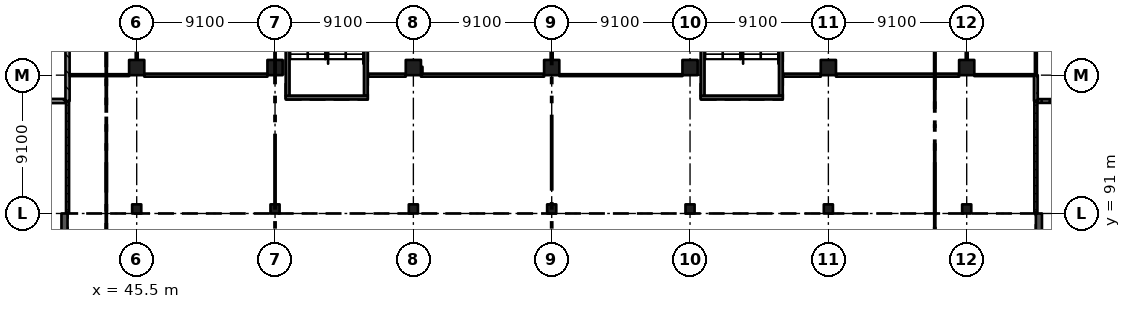
"""IFC4 building model, lengths in metres.
Left out: names, types, materials, properties, quantities, classifications, styles, units other than length and angle.
Written with IfcOpenShell. Run it as: python <this file> out.ifc"""

import sys

from ifc_helpers import new_model, si_unit, direction, frame, frame_2d, origin, origin_2d, place, context, subcontext, project, spatial, rectangle, extrude, element, fill, save


model = new_model("IFC4")
c1 = context("Model", 3, precision=1e-05, world=origin(), true_north=direction((0.0, 1.0)))
c2 = subcontext(c1, "Body", "Model", "MODEL_VIEW")
j1 = project(units=[si_unit("LENGTHUNIT", "METRE"), si_unit("PLANEANGLEUNIT", "RADIAN")], contexts=[c1])
p1 = place(None, origin())
s1 = spatial("IfcSite", under=j1, at=p1, CompositionType="ELEMENT")
p2 = place(p1, origin())
s2 = spatial("IfcBuilding", under=s1, at=p2, CompositionType="ELEMENT")
p3 = place(p2, frame((0.0, 0.0, 6.37)))
s3 = spatial("IfcBuildingStorey", under=s2, at=p3, CompositionType="ELEMENT", Elevation=6.37)
p4 = place(p3, frame((45.5, 91.3, 0.0), z_axis=(0.0, 0.0, 1.0), x_axis=(1.0, 0.0, 0.0)))
e1 = element("IfcColumn", 1, at=p4, inside=s3, PredefinedType="COLUMN", context=c2, shape_type="SweptSolid", body=[
    extrude(rectangle(XDim=0.6, YDim=0.6, at=origin_2d()), origin(), (0.0, 0.0, 1.0), 4.55),
])
p5 = place(p3, frame((45.5, 100.6, 0.0), z_axis=(0.0, 0.0, 1.0), x_axis=(1.0, 0.0, 0.0)))
e2 = element("IfcColumn", 2, at=p5, inside=s3, PredefinedType="COLUMN", context=c2, shape_type="SweptSolid", body=[
    extrude(rectangle(XDim=1.0, YDim=1.0, at=origin_2d()), origin(), (0.0, 0.0, 1.0), 4.55),
])
p6 = place(p3, frame((54.6, 91.3, 0.0), z_axis=(0.0, 0.0, 1.0), x_axis=(1.0, 0.0, 0.0)))
e3 = element("IfcColumn", 3, at=p6, inside=s3, PredefinedType="COLUMN", context=c2, shape_type="SweptSolid", body=[
    extrude(rectangle(XDim=0.6, YDim=0.6, at=origin_2d()), origin(), (0.0, 0.0, 1.0), 4.55),
])
p7 = place(p3, frame((54.6, 100.6, 0.0), z_axis=(0.0, 0.0, 1.0), x_axis=(1.0, 0.0, 0.0)))
e4 = element("IfcColumn", 4, at=p7, inside=s3, PredefinedType="COLUMN", context=c2, shape_type="SweptSolid", body=[
    extrude(rectangle(XDim=1.0, YDim=1.0, at=origin_2d()), origin(), (0.0, 0.0, 1.0), 4.55),
])
p8 = place(p3, frame((63.7, 91.3, 0.0), z_axis=(0.0, 0.0, 1.0), x_axis=(1.0, 0.0, 0.0)))
e5 = element("IfcColumn", 5, at=p8, inside=s3, PredefinedType="COLUMN", context=c2, shape_type="SweptSolid", body=[
    extrude(rectangle(XDim=0.6, YDim=0.6, at=origin_2d()), origin(), (0.0, 0.0, 1.0), 4.55),
])
p9 = place(p3, frame((63.7, 100.6, 0.0), z_axis=(0.0, 0.0, 1.0), x_axis=(1.0, 0.0, 0.0)))
e6 = element("IfcColumn", 6, at=p9, inside=s3, PredefinedType="COLUMN", context=c2, shape_type="SweptSolid", body=[
    extrude(rectangle(XDim=1.0, YDim=1.0, at=origin_2d()), origin(), (0.0, 0.0, 1.0), 4.55),
])
p10 = place(p3, frame((72.8, 91.3, 0.0), z_axis=(0.0, 0.0, 1.0), x_axis=(1.0, 0.0, 0.0)))
e7 = element("IfcColumn", 7, at=p10, inside=s3, PredefinedType="COLUMN", context=c2, shape_type="SweptSolid", body=[
    extrude(rectangle(XDim=0.6, YDim=0.6, at=origin_2d()), origin(), (0.0, 0.0, 1.0), 4.55),
])
p11 = place(p3, frame((72.8, 100.6, 0.0), z_axis=(0.0, 0.0, 1.0), x_axis=(1.0, 0.0, 0.0)))
e8 = element("IfcColumn", 8, at=p11, inside=s3, PredefinedType="COLUMN", context=c2, shape_type="SweptSolid", body=[
    extrude(rectangle(XDim=1.0, YDim=1.0, at=origin_2d()), origin(), (0.0, 0.0, 1.0), 4.55),
])
p12 = place(p3, frame((81.9, 91.3, 0.0), z_axis=(0.0, 0.0, 1.0), x_axis=(1.0, 0.0, 0.0)))
e9 = element("IfcColumn", 9, at=p12, inside=s3, PredefinedType="COLUMN", context=c2, shape_type="SweptSolid", body=[
    extrude(rectangle(XDim=0.6, YDim=0.6, at=origin_2d()), origin(), (0.0, 0.0, 1.0), 4.55),
])
p13 = place(p3, frame((81.9, 100.6, 0.0), z_axis=(0.0, 0.0, 1.0), x_axis=(1.0, 0.0, 0.0)))
e10 = element("IfcColumn", 10, at=p13, inside=s3, PredefinedType="COLUMN", context=c2, shape_type="SweptSolid", body=[
    extrude(rectangle(XDim=1.0, YDim=1.0, at=origin_2d()), origin(), (0.0, 0.0, 1.0), 4.55),
])
p14 = place(p3, frame((91.0, 91.3, 0.0), z_axis=(0.0, 0.0, 1.0), x_axis=(1.0, 0.0, 0.0)))
e11 = element("IfcColumn", 11, at=p14, inside=s3, PredefinedType="COLUMN", context=c2, shape_type="SweptSolid", body=[
    extrude(rectangle(XDim=0.6, YDim=0.6, at=origin_2d()), origin(), (0.0, 0.0, 1.0), 4.55),
])
p15 = place(p3, frame((91.0, 100.6, 0.0), z_axis=(0.0, 0.0, 1.0), x_axis=(1.0, 0.0, 0.0)))
e12 = element("IfcColumn", 12, at=p15, inside=s3, PredefinedType="COLUMN", context=c2, shape_type="SweptSolid", body=[
    extrude(rectangle(XDim=1.0, YDim=1.0, at=origin_2d()), origin(), (0.0, 0.0, 1.0), 4.55),
])
p16 = place(p3, frame((100.1, 91.3, 0.0), z_axis=(0.0, 0.0, 1.0), x_axis=(1.0, 0.0, 0.0)))
e13 = element("IfcColumn", 13, at=p16, inside=s3, PredefinedType="COLUMN", context=c2, shape_type="SweptSolid", body=[
    extrude(rectangle(XDim=0.6, YDim=0.6, at=origin_2d()), origin(), (0.0, 0.0, 1.0), 4.55),
])
p17 = place(p3, frame((100.1, 100.6, 0.0), z_axis=(0.0, 0.0, 1.0), x_axis=(1.0, 0.0, 0.0)))
e14 = element("IfcColumn", 14, at=p17, inside=s3, PredefinedType="COLUMN", context=c2, shape_type="SweptSolid", body=[
    extrude(rectangle(XDim=1.0, YDim=1.0, at=origin_2d()), origin(), (0.0, 0.0, 1.0), 4.55),
])
for number, where, z_axis, x_axis in (
    (15, (40.75, 68.25, 0.0), (0.0, 0.0, 1.0), (0.0, 1.0, 0.0)),
    (16, (104.85, 68.25, 0.0), (0.0, 0.0, 1.0), (0.0, 1.0, 0.0)),
):
    element("IfcWall", number, at=place(p3, frame(where, z_axis=z_axis, x_axis=x_axis)), inside=s3, PredefinedType="SHEAR", context=c2, shape_type="SweptSolid", body=[
        extrude(rectangle(XDim=22.75, YDim=0.4, at=frame_2d((11.375, 0.0))), origin(), (0.0, 0.0, 1.0), 4.55),
    ])
p18 = place(p3, frame((60.7, 98.625, 0.0), z_axis=(0.0, 0.0, 1.0), x_axis=(-1.0, 0.0, 0.0)))
e17 = element("IfcWall", 17, at=p18, inside=s3, PredefinedType="SHEAR", context=c2, shape_type="SweptSolid", body=[
    extrude(rectangle(XDim=5.4, YDim=0.25, at=frame_2d((2.7, 0.0))), origin(), (0.0, 0.0, 1.0), 4.55),
])
p19 = place(p18, frame((1.5, 0.0, 0.0)))
e18 = element("IfcOpeningElement", 18, at=p19, cuts=e17, PredefinedType="OPENING", context=c2, shape_type="SweptSolid", body=[
    extrude(rectangle(XDim=2.4, YDim=2.1, at=frame_2d((1.2, 1.05))), frame((0.0, 0.135, 0.0), z_axis=(0.0, -1.0, 0.0), x_axis=(1.0, 0.0, 0.0)), (0.0, 0.0, 1.0), 0.27),
])
for number, where, z_axis, x_axis in (
    (19, (55.425, 108.35, 0.0), (0.0, 0.0, 1.0), (0.0, -1.0, 0.0)),
    (20, (60.575, 108.35, 0.0), (0.0, 0.0, 1.0), (0.0, -1.0, 0.0)),
):
    element("IfcWall", number, at=place(p3, frame(where, z_axis=z_axis, x_axis=x_axis)), inside=s3, PredefinedType="SHEAR", context=c2, shape_type="SweptSolid", body=[
        extrude(rectangle(XDim=9.6, YDim=0.25, at=frame_2d((4.8, 0.0))), origin(), (0.0, 0.0, 1.0), 4.55),
    ])
p20 = place(p3, frame((88.0, 98.625, 0.0), z_axis=(0.0, 0.0, 1.0), x_axis=(-1.0, 0.0, 0.0)))
e21 = element("IfcWall", 21, at=p20, inside=s3, PredefinedType="SHEAR", context=c2, shape_type="SweptSolid", body=[
    extrude(rectangle(XDim=5.4, YDim=0.25, at=frame_2d((2.7, 0.0))), origin(), (0.0, 0.0, 1.0), 4.55),
])
p21 = place(p20, frame((1.5, 0.0, 0.0)))
e22 = element("IfcOpeningElement", 22, at=p21, cuts=e21, PredefinedType="OPENING", context=c2, shape_type="SweptSolid", body=[
    extrude(rectangle(XDim=2.4, YDim=2.1, at=frame_2d((1.2, 1.05))), frame((0.0, 0.135, 0.0), z_axis=(0.0, -1.0, 0.0), x_axis=(1.0, 0.0, 0.0)), (0.0, 0.0, 1.0), 0.27),
])
for number, where, z_axis, x_axis in (
    (23, (82.725, 108.35, 0.0), (0.0, 0.0, 1.0), (0.0, -1.0, 0.0)),
    (24, (87.875, 108.35, 0.0), (0.0, 0.0, 1.0), (0.0, -1.0, 0.0)),
):
    element("IfcWall", number, at=place(p3, frame(where, z_axis=z_axis, x_axis=x_axis)), inside=s3, PredefinedType="SHEAR", context=c2, shape_type="SweptSolid", body=[
        extrude(rectangle(XDim=9.6, YDim=0.25, at=frame_2d((4.8, 0.0))), origin(), (0.0, 0.0, 1.0), 4.55),
    ])
p22 = place(p3, frame((36.825, 98.4, 0.0), z_axis=(0.0, 0.0, 1.0), x_axis=(1.0, 0.0, 0.0)))
e25 = element("IfcWall", 25, at=p22, inside=s3, PredefinedType="SOLIDWALL", context=c2, shape_type="SweptSolid", body=[
    extrude(rectangle(XDim=3.988, YDim=0.275, at=frame_2d((1.994, 0.0))), origin(), (0.0, 0.0, 1.0), 4.25),
])
p23 = place(p22, frame((1.35, 0.0, 0.0)))
e26 = element("IfcOpeningElement", 26, at=p23, cuts=e25, PredefinedType="OPENING", context=c2, shape_type="SweptSolid", body=[
    extrude(rectangle(XDim=1.2, YDim=2.4, at=frame_2d((0.6, 1.2))), frame((0.0, 0.147, 0.0), z_axis=(0.0, -1.0, 0.0), x_axis=(1.0, 0.0, 0.0)), (0.0, 0.0, 1.0), 0.295),
])
p24 = place(p3, frame((40.95, 98.4, 0.0), z_axis=(0.0, 0.0, 1.0), x_axis=(0.0, -1.0, 0.0)))
e27 = element("IfcWall", 27, at=p24, inside=s3, PredefinedType="PARTITIONING", context=c2, shape_type="SweptSolid", body=[
    extrude(rectangle(XDim=7.37, YDim=0.2, at=frame_2d((3.685, 0.0))), origin(), (0.0, 0.0, 1.0), 4.25),
])
p25 = place(p24, frame((0.95, 0.0, 0.0)))
e28 = element("IfcOpeningElement", 28, at=p25, cuts=e27, PredefinedType="OPENING", context=c2, shape_type="SweptSolid", body=[
    extrude(rectangle(XDim=1.8, YDim=2.4, at=frame_2d((0.9, 1.2))), frame((0.0, 0.11, 0.0), z_axis=(0.0, -1.0, 0.0), x_axis=(1.0, 0.0, 0.0)), (0.0, 0.0, 1.0), 0.22),
])
p26 = place(p24, frame((4.65, 0.0, 0.0)))
e29 = element("IfcOpeningElement", 29, at=p26, cuts=e27, PredefinedType="OPENING", context=c2, shape_type="SweptSolid", body=[
    extrude(rectangle(XDim=1.8, YDim=2.4, at=frame_2d((0.9, 1.2))), frame((0.0, 0.11, 0.0), z_axis=(0.0, -1.0, 0.0), x_axis=(1.0, 0.0, 0.0)), (0.0, 0.0, 1.0), 0.22),
])
p27 = place(p3, frame((40.95, 98.4, 0.0), z_axis=(0.0, 0.0, 1.0), x_axis=(0.0, 1.0, 0.0)))
e30 = element("IfcWall", 30, at=p27, inside=s3, PredefinedType="SOLIDWALL", context=c2, shape_type="SweptSolid", body=[
    extrude(rectangle(XDim=10.77, YDim=0.275, at=frame_2d((5.385, 0.0))), origin(), (0.0, 0.0, 1.0), 4.25),
])
p28 = place(p3, frame((41.087, 100.1, 0.0), z_axis=(0.0, 0.0, 1.0), x_axis=(1.0, 0.0, 0.0)))
e31 = element("IfcWall", 31, at=p28, inside=s3, PredefinedType="PARTITIONING", context=c2, shape_type="SweptSolid", body=[
    extrude(rectangle(XDim=3.913, YDim=0.125, at=frame_2d((1.956, 0.0))), origin(), (0.0, 0.0, 1.0), 3.55),
])
p29 = place(p28, frame((1.45, 0.0, 0.0)))
e32 = element("IfcOpeningElement", 32, at=p29, cuts=e31, PredefinedType="OPENING", context=c2, shape_type="SweptSolid", body=[
    extrude(rectangle(XDim=1.0, YDim=2.1, at=frame_2d((0.5, 1.05))), frame((0.0, 0.073, 0.0), z_axis=(0.0, -1.0, 0.0), x_axis=(1.0, 0.0, 0.0)), (0.0, 0.0, 1.0), 0.145),
])
p30 = place(p3, frame((45.5, 108.925, 0.0), z_axis=(0.0, 0.0, 1.0), x_axis=(0.0, -1.0, 0.0)))
e33 = element("IfcWall", 33, at=p30, inside=s3, PredefinedType="PARTITIONING", context=c2, shape_type="SweptSolid", body=[
    extrude(rectangle(XDim=7.825, YDim=0.125, at=frame_2d((3.913, 0.0))), origin(), (0.0, 0.0, 1.0), 3.55),
])
p31 = place(p3, frame((46.0, 100.1, 0.0), z_axis=(0.0, 0.0, 1.0), x_axis=(1.0, 0.0, 0.0)))
e34 = element("IfcWall", 34, at=p31, inside=s3, PredefinedType="PARTITIONING", context=c2, shape_type="SweptSolid", body=[
    extrude(rectangle(XDim=8.1, YDim=0.2, at=frame_2d((4.05, 0.0))), origin(), (0.0, 0.0, 1.0), 3.55),
])
p32 = place(p31, frame((3.15, 0.0, 0.0)))
e35 = element("IfcOpeningElement", 35, at=p32, cuts=e34, PredefinedType="OPENING", context=c2, shape_type="SweptSolid", body=[
    extrude(rectangle(XDim=1.8, YDim=2.1, at=frame_2d((0.9, 1.05))), frame((0.0, 0.11, 0.0), z_axis=(0.0, -1.0, 0.0), x_axis=(1.0, 0.0, 0.0)), (0.0, 0.0, 1.0), 0.22),
])
p33 = place(p3, frame((60.73, 100.1, 0.0), z_axis=(0.0, 0.0, 1.0), x_axis=(1.0, 0.0, 0.0)))
e36 = element("IfcWall", 36, at=p33, inside=s3, PredefinedType="PARTITIONING", context=c2, shape_type="SweptSolid", body=[
    extrude(rectangle(XDim=2.47, YDim=0.2, at=frame_2d((1.235, 0.0))), origin(), (0.0, 0.0, 1.0), 3.8),
])
p34 = place(p3, frame((64.2, 100.1, 0.0), z_axis=(0.0, 0.0, 1.0), x_axis=(1.0, 0.0, 0.0)))
e37 = element("IfcWall", 37, at=p34, inside=s3, PredefinedType="PARTITIONING", context=c2, shape_type="SweptSolid", body=[
    extrude(rectangle(XDim=8.1, YDim=0.2, at=frame_2d((4.05, 0.0))), origin(), (0.0, 0.0, 1.0), 3.55),
])
p35 = place(p34, frame((3.15, 0.0, 0.0)))
e38 = element("IfcOpeningElement", 38, at=p35, cuts=e37, PredefinedType="OPENING", context=c2, shape_type="SweptSolid", body=[
    extrude(rectangle(XDim=1.8, YDim=2.1, at=frame_2d((0.9, 1.05))), frame((0.0, 0.11, 0.0), z_axis=(0.0, -1.0, 0.0), x_axis=(1.0, 0.0, 0.0)), (0.0, 0.0, 1.0), 0.22),
])
p36 = place(p3, frame((64.2, 100.65, 0.0), z_axis=(0.0, 0.0, 1.0), x_axis=(0.0, -1.0, 0.0)))
e39 = element("IfcWall", 39, at=p36, inside=s3, PredefinedType="PARTITIONING", context=c2, shape_type="SweptSolid", body=[
    extrude(rectangle(XDim=0.5, YDim=0.2, at=frame_2d((0.25, 0.0))), origin(), (0.0, 0.0, 1.0), 4.25),
])
p37 = place(p3, frame((72.8, 108.925, 0.0), z_axis=(0.0, 0.0, 1.0), x_axis=(0.0, -1.0, 0.0)))
e40 = element("IfcWall", 40, at=p37, inside=s3, PredefinedType="PARTITIONING", context=c2, shape_type="SweptSolid", body=[
    extrude(rectangle(XDim=7.825, YDim=0.125, at=frame_2d((3.913, 0.0))), origin(), (0.0, 0.0, 1.0), 3.55),
])
p38 = place(p3, frame((73.3, 100.1, 0.0), z_axis=(0.0, 0.0, 1.0), x_axis=(1.0, 0.0, 0.0)))
e41 = element("IfcWall", 41, at=p38, inside=s3, PredefinedType="PARTITIONING", context=c2, shape_type="SweptSolid", body=[
    extrude(rectangle(XDim=8.1, YDim=0.125, at=frame_2d((4.05, 0.0))), origin(), (0.0, 0.0, 1.0), 3.55),
])
p39 = place(p38, frame((3.65, 0.0, 0.0)))
e42 = element("IfcOpeningElement", 42, at=p39, cuts=e41, PredefinedType="OPENING", context=c2, shape_type="SweptSolid", body=[
    extrude(rectangle(XDim=0.9, YDim=2.1, at=frame_2d((0.45, 1.05))), frame((0.0, 0.073, 0.0), z_axis=(0.0, -1.0, 0.0), x_axis=(1.0, 0.0, 0.0)), (0.0, 0.0, 1.0), 0.145),
])
p40 = place(p3, frame((88.03, 100.1, 0.0), z_axis=(0.0, 0.0, 1.0), x_axis=(1.0, 0.0, 0.0)))
e43 = element("IfcWall", 43, at=p40, inside=s3, PredefinedType="PARTITIONING", context=c2, shape_type="SweptSolid", body=[
    extrude(rectangle(XDim=2.47, YDim=0.2, at=frame_2d((1.235, 0.0))), origin(), (0.0, 0.0, 1.0), 3.8),
])
p41 = place(p3, frame((91.5, 100.1, 0.0), z_axis=(0.0, 0.0, 1.0), x_axis=(1.0, 0.0, 0.0)))
e44 = element("IfcWall", 44, at=p41, inside=s3, PredefinedType="PARTITIONING", context=c2, shape_type="SweptSolid", body=[
    extrude(rectangle(XDim=8.1, YDim=0.2, at=frame_2d((4.05, 0.0))), origin(), (0.0, 0.0, 1.0), 3.55),
])
p42 = place(p41, frame((3.15, 0.0, 0.0)))
e45 = element("IfcOpeningElement", 45, at=p42, cuts=e44, PredefinedType="OPENING", context=c2, shape_type="SweptSolid", body=[
    extrude(rectangle(XDim=1.8, YDim=2.1, at=frame_2d((0.9, 1.05))), frame((0.0, 0.11, 0.0), z_axis=(0.0, -1.0, 0.0), x_axis=(1.0, 0.0, 0.0)), (0.0, 0.0, 1.0), 0.22),
])
p43 = place(p3, frame((100.1, 108.925, 0.0), z_axis=(0.0, 0.0, 1.0), x_axis=(0.0, -1.0, 0.0)))
e46 = element("IfcWall", 46, at=p43, inside=s3, PredefinedType="PARTITIONING", context=c2, shape_type="SweptSolid", body=[
    extrude(rectangle(XDim=7.825, YDim=0.125, at=frame_2d((3.913, 0.0))), origin(), (0.0, 0.0, 1.0), 3.55),
])
p44 = place(p3, frame((100.6, 100.1, 0.0), z_axis=(0.0, 0.0, 1.0), x_axis=(1.0, 0.0, 0.0)))
e47 = element("IfcWall", 47, at=p44, inside=s3, PredefinedType="PARTITIONING", context=c2, shape_type="SweptSolid", body=[
    extrude(rectangle(XDim=3.925, YDim=0.125, at=frame_2d((1.962, 0.0))), origin(), (0.0, 0.0, 1.0), 3.55),
])
p45 = place(p44, frame((1.55, 0.0, 0.0)))
e48 = element("IfcOpeningElement", 48, at=p45, cuts=e47, PredefinedType="OPENING", context=c2, shape_type="SweptSolid", body=[
    extrude(rectangle(XDim=0.9, YDim=2.1, at=frame_2d((0.45, 1.05))), frame((0.0, 0.073, 0.0), z_axis=(0.0, -1.0, 0.0), x_axis=(1.0, 0.0, 0.0)), (0.0, 0.0, 1.0), 0.145),
])
p46 = place(p3, frame((104.65, 91.03, 0.0), z_axis=(0.0, 0.0, 1.0), x_axis=(0.0, 1.0, 0.0)))
e49 = element("IfcWall", 49, at=p46, inside=s3, PredefinedType="PARTITIONING", context=c2, shape_type="SweptSolid", body=[
    extrude(rectangle(XDim=7.37, YDim=0.2, at=frame_2d((3.685, 0.0))), origin(), (0.0, 0.0, 1.0), 4.25),
])
p47 = place(p46, frame((0.95, 0.0, 0.0)))
e50 = element("IfcOpeningElement", 50, at=p47, cuts=e49, PredefinedType="OPENING", context=c2, shape_type="SweptSolid", body=[
    extrude(rectangle(XDim=1.8, YDim=2.4, at=frame_2d((0.9, 1.2))), frame((0.0, 0.11, 0.0), z_axis=(0.0, -1.0, 0.0), x_axis=(1.0, 0.0, 0.0)), (0.0, 0.0, 1.0), 0.22),
])
p48 = place(p46, frame((4.65, 0.0, 0.0)))
e51 = element("IfcOpeningElement", 51, at=p48, cuts=e49, PredefinedType="OPENING", context=c2, shape_type="SweptSolid", body=[
    extrude(rectangle(XDim=1.8, YDim=2.4, at=frame_2d((0.9, 1.2))), frame((0.0, 0.11, 0.0), z_axis=(0.0, -1.0, 0.0), x_axis=(1.0, 0.0, 0.0)), (0.0, 0.0, 1.0), 0.22),
])
p49 = place(p3, frame((104.65, 98.4, 0.0), z_axis=(0.0, 0.0, 1.0), x_axis=(0.0, 1.0, 0.0)))
e52 = element("IfcWall", 52, at=p49, inside=s3, PredefinedType="SOLIDWALL", context=c2, shape_type="SweptSolid", body=[
    extrude(rectangle(XDim=1.7, YDim=0.25, at=frame_2d((0.85, 0.0))), origin(), (0.0, 0.0, 1.0), 4.25),
])
p50 = place(p3, frame((104.65, 100.1, 0.0), z_axis=(0.0, 0.0, 1.0), x_axis=(0.0, 1.0, 0.0)))
e53 = element("IfcWall", 53, at=p50, inside=s3, PredefinedType="PARTITIONING", context=c2, shape_type="SweptSolid", body=[
    extrude(rectangle(XDim=9.07, YDim=0.125, at=frame_2d((4.535, 0.0))), origin(), (0.0, 0.0, 1.0), 4.25),
])
p51 = place(p3, frame((104.775, 98.4, 0.0), z_axis=(0.0, 0.0, 1.0), x_axis=(1.0, 0.0, 0.0)))
e54 = element("IfcWall", 54, at=p51, inside=s3, PredefinedType="SOLIDWALL", context=c2, shape_type="SweptSolid", body=[
    extrude(rectangle(XDim=4.025, YDim=0.25, at=frame_2d((2.013, 0.0))), origin(), (0.0, 0.0, 1.0), 4.25),
])
p52 = place(p51, frame((1.15, 0.0, 0.0)))
e55 = element("IfcOpeningElement", 55, at=p52, cuts=e54, PredefinedType="OPENING", context=c2, shape_type="SweptSolid", body=[
    extrude(rectangle(XDim=1.8, YDim=2.1, at=frame_2d((0.9, 1.05))), frame((0.0, 0.135, 0.0), z_axis=(0.0, -1.0, 0.0), x_axis=(1.0, 0.0, 0.0)), (0.0, 0.0, 1.0), 0.27),
])
p53 = place(p29, origin())
e56 = element("IfcDoor", 56, at=p53, inside=s3, OperationType="SINGLE_SWING_RIGHT", PredefinedType="DOOR", context=c2, shape_type="SweptSolid", body=[
    extrude(rectangle(XDim=1.0, YDim=2.1, at=frame_2d((0.5, 1.05))), frame((0.0, 0.025, 0.0), z_axis=(0.0, -1.0, 0.0), x_axis=(1.0, 0.0, 0.0)), (0.0, 0.0, 1.0), 0.05),
])
fill(e32, e56)
p54 = place(p32, origin())
e57 = element("IfcDoor", 57, at=p54, inside=s3, OperationType="DOUBLE_DOOR_SINGLE_SWING", PredefinedType="DOOR", context=c2, shape_type="SweptSolid", body=[
    extrude(rectangle(XDim=1.8, YDim=2.1, at=frame_2d((0.9, 1.05))), frame((0.0, 0.025, 0.0), z_axis=(0.0, -1.0, 0.0), x_axis=(1.0, 0.0, 0.0)), (0.0, 0.0, 1.0), 0.05),
])
fill(e35, e57)
p55 = place(p35, origin())
e58 = element("IfcDoor", 58, at=p55, inside=s3, OperationType="DOUBLE_DOOR_SINGLE_SWING", PredefinedType="DOOR", context=c2, shape_type="SweptSolid", body=[
    extrude(rectangle(XDim=1.8, YDim=2.1, at=frame_2d((0.9, 1.05))), frame((0.0, 0.025, 0.0), z_axis=(0.0, -1.0, 0.0), x_axis=(1.0, 0.0, 0.0)), (0.0, 0.0, 1.0), 0.05),
])
fill(e38, e58)
p56 = place(p39, origin())
e59 = element("IfcDoor", 59, at=p56, inside=s3, OperationType="SINGLE_SWING_LEFT", PredefinedType="DOOR", context=c2, shape_type="SweptSolid", body=[
    extrude(rectangle(XDim=0.9, YDim=2.1, at=frame_2d((0.45, 1.05))), frame((0.0, 0.025, 0.0), z_axis=(0.0, -1.0, 0.0), x_axis=(1.0, 0.0, 0.0)), (0.0, 0.0, 1.0), 0.05),
])
fill(e42, e59)
p57 = place(p42, origin())
e60 = element("IfcDoor", 60, at=p57, inside=s3, OperationType="DOUBLE_DOOR_SINGLE_SWING", PredefinedType="DOOR", context=c2, shape_type="SweptSolid", body=[
    extrude(rectangle(XDim=1.8, YDim=2.1, at=frame_2d((0.9, 1.05))), frame((0.0, 0.025, 0.0), z_axis=(0.0, -1.0, 0.0), x_axis=(1.0, 0.0, 0.0)), (0.0, 0.0, 1.0), 0.05),
])
fill(e45, e60)
p58 = place(p45, origin())
e61 = element("IfcDoor", 61, at=p58, inside=s3, OperationType="SINGLE_SWING_LEFT", PredefinedType="DOOR", context=c2, shape_type="SweptSolid", body=[
    extrude(rectangle(XDim=0.9, YDim=2.1, at=frame_2d((0.45, 1.05))), frame((0.0, 0.025, 0.0), z_axis=(0.0, -1.0, 0.0), x_axis=(1.0, 0.0, 0.0)), (0.0, 0.0, 1.0), 0.05),
])
fill(e48, e61)
p59 = place(p47, origin())
e62 = element("IfcDoor", 62, at=p59, inside=s3, OperationType="DOUBLE_DOOR_SINGLE_SWING", PredefinedType="DOOR", context=c2, shape_type="SweptSolid", body=[
    extrude(rectangle(XDim=1.8, YDim=2.4, at=frame_2d((0.9, 1.2))), frame((0.0, 0.025, 0.0), z_axis=(0.0, -1.0, 0.0), x_axis=(1.0, 0.0, 0.0)), (0.0, 0.0, 1.0), 0.05),
])
fill(e50, e62)
p60 = place(p48, origin())
e63 = element("IfcDoor", 63, at=p60, inside=s3, OperationType="DOUBLE_DOOR_SINGLE_SWING", PredefinedType="DOOR", context=c2, shape_type="SweptSolid", body=[
    extrude(rectangle(XDim=1.8, YDim=2.4, at=frame_2d((0.9, 1.2))), frame((0.0, 0.025, 0.0), z_axis=(0.0, -1.0, 0.0), x_axis=(1.0, 0.0, 0.0)), (0.0, 0.0, 1.0), 0.05),
])
fill(e51, e63)
p61 = place(p25, origin())
e64 = element("IfcDoor", 64, at=p61, inside=s3, OperationType="DOUBLE_DOOR_SINGLE_SWING", PredefinedType="DOOR", context=c2, shape_type="SweptSolid", body=[
    extrude(rectangle(XDim=1.8, YDim=2.4, at=frame_2d((0.9, 1.2))), frame((0.0, 0.025, 0.0), z_axis=(0.0, -1.0, 0.0), x_axis=(1.0, 0.0, 0.0)), (0.0, 0.0, 1.0), 0.05),
])
fill(e28, e64)
p62 = place(p26, origin())
e65 = element("IfcDoor", 65, at=p62, inside=s3, OperationType="DOUBLE_DOOR_SINGLE_SWING", PredefinedType="DOOR", context=c2, shape_type="SweptSolid", body=[
    extrude(rectangle(XDim=1.8, YDim=2.4, at=frame_2d((0.9, 1.2))), frame((0.0, 0.025, 0.0), z_axis=(0.0, -1.0, 0.0), x_axis=(1.0, 0.0, 0.0)), (0.0, 0.0, 1.0), 0.05),
])
fill(e29, e65)
p63 = place(p19, origin())
e66 = element("IfcDoor", 66, at=p63, inside=s3, OperationType="DOUBLE_DOOR_SINGLE_SWING", PredefinedType="DOOR", context=c2, shape_type="SweptSolid", body=[
    extrude(rectangle(XDim=2.4, YDim=2.1, at=frame_2d((1.2, 1.05))), frame((0.0, 0.025, 0.0), z_axis=(0.0, -1.0, 0.0), x_axis=(1.0, 0.0, 0.0)), (0.0, 0.0, 1.0), 0.05),
])
fill(e18, e66)
p64 = place(p21, origin())
e67 = element("IfcDoor", 67, at=p64, inside=s3, OperationType="DOUBLE_DOOR_SINGLE_SWING", PredefinedType="DOOR", context=c2, shape_type="SweptSolid", body=[
    extrude(rectangle(XDim=2.4, YDim=2.1, at=frame_2d((1.2, 1.05))), frame((0.0, 0.025, 0.0), z_axis=(0.0, -1.0, 0.0), x_axis=(1.0, 0.0, 0.0)), (0.0, 0.0, 1.0), 0.05),
])
fill(e22, e67)
save(model, sys.argv[1])
